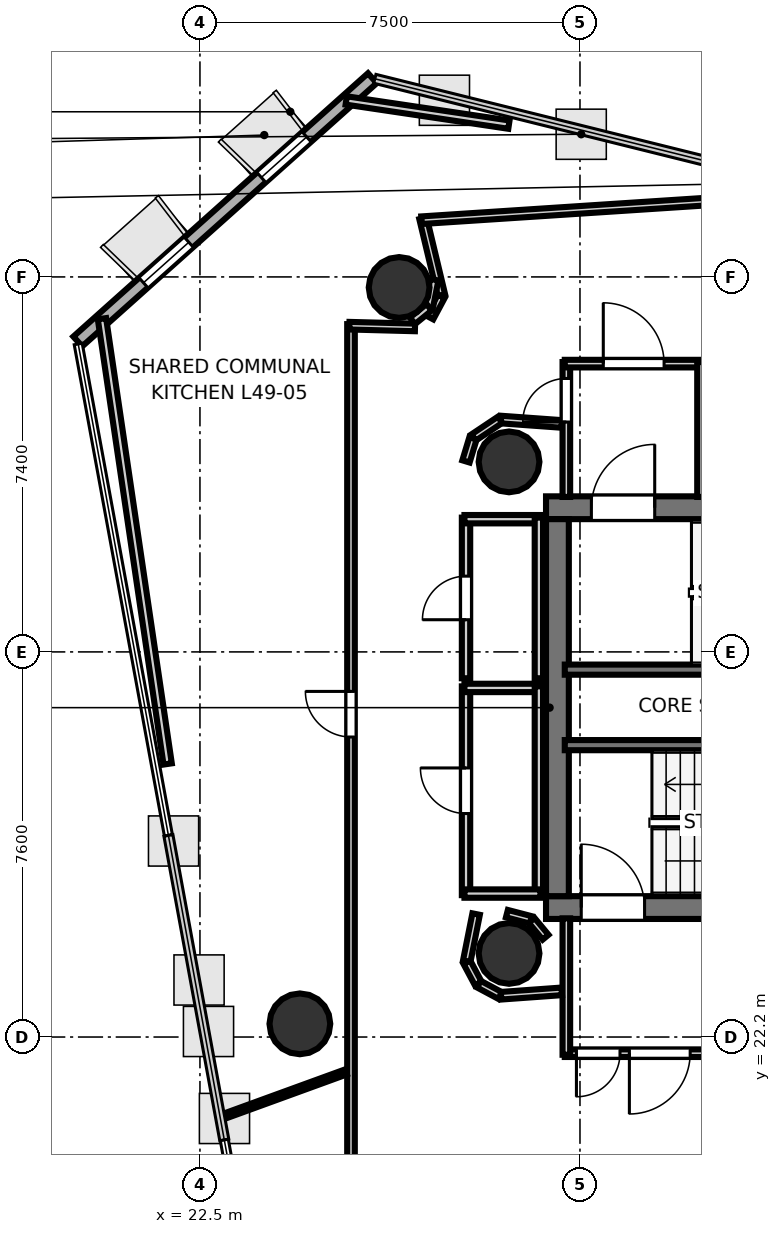
"""IFC4 building model, lengths in metres.
Left out: names, types, materials, properties, quantities, classifications, styles, units other than length and angle.
Written with IfcOpenShell. Run it as: python <this file> out.ifc"""

import sys

from ifc_helpers import new_model, si_unit, direction, frame, frame_2d, origin, origin_2d, place, context, subcontext, project, spatial, rectangle, hollow_circle, extrude, element, fill, save


model = new_model("IFC4")
c1 = context("Model", 3, precision=1e-05, world=origin(), true_north=direction((0.0, 1.0)))
c2 = subcontext(c1, "Body", "Model", "MODEL_VIEW")
j1 = project(units=[si_unit("LENGTHUNIT", "METRE"), si_unit("PLANEANGLEUNIT", "RADIAN")], contexts=[c1])
p1 = place(None, origin())
s1 = spatial("IfcSite", under=j1, at=p1, CompositionType="ELEMENT")
p2 = place(p1, origin())
s2 = spatial("IfcBuilding", under=s1, at=p2, CompositionType="ELEMENT")
p3 = place(p2, frame((0.0, 0.0, 192.9)))
s3 = spatial("IfcBuildingStorey", under=s2, at=p3, CompositionType="ELEMENT", Elevation=192.9)
p4 = place(p3, frame((29.33, 32.645, 0.0), z_axis=(0.0, 0.0, 1.0), x_axis=(1.0, 0.0, 0.0)))
e1 = element("IfcWall", 1, at=p4, inside=s3, PredefinedType="SHEAR", context=c2, shape_type="SweptSolid", body=[
    extrude(rectangle(XDim=10.52, YDim=0.45, at=frame_2d((5.26, 0.0))), origin(), (0.0, 0.0, 1.0), 3.52),
])
p5 = place(p4, frame((0.895, 0.0, 0.0)))
e2 = element("IfcOpeningElement", 2, at=p5, cuts=e1, PredefinedType="OPENING", context=c2, shape_type="SweptSolid", body=[
    extrude(rectangle(XDim=1.25, YDim=2.15, at=frame_2d((0.625, 1.075))), frame((0.0, 0.235, 0.0), z_axis=(0.0, -1.0, 0.0), x_axis=(1.0, 0.0, 0.0)), (0.0, 0.0, 1.0), 0.47),
])
p6 = place(p3, frame((29.33, 24.755, 0.0), z_axis=(0.0, 0.0, 1.0), x_axis=(1.0, 0.0, 0.0)))
e3 = element("IfcWall", 3, at=p6, inside=s3, PredefinedType="SHEAR", context=c2, shape_type="SweptSolid", body=[
    extrude(rectangle(XDim=10.52, YDim=0.45, at=frame_2d((5.26, 0.0))), origin(), (0.0, 0.0, 1.0), 3.52),
])
p7 = place(p6, frame((0.695, 0.0, 0.0)))
e4 = element("IfcOpeningElement", 4, at=p7, cuts=e3, PredefinedType="OPENING", context=c2, shape_type="SweptSolid", body=[
    extrude(rectangle(XDim=1.25, YDim=2.15, at=frame_2d((0.625, 1.075))), frame((0.0, 0.235, 0.0), z_axis=(0.0, -1.0, 0.0), x_axis=(1.0, 0.0, 0.0)), (0.0, 0.0, 1.0), 0.47),
])
p8 = place(p3, frame((29.555, 24.98, 0.0), z_axis=(0.0, 0.0, 1.0), x_axis=(0.0, 1.0, 0.0)))
e5 = element("IfcWall", 5, at=p8, inside=s3, PredefinedType="SHEAR", context=c2, shape_type="SweptSolid", body=[
    extrude(rectangle(XDim=7.44, YDim=0.45, at=frame_2d((3.72, 0.0))), origin(), (0.0, 0.0, 1.0), 3.52),
])
for number, where, z_axis, x_axis in (
    (6, (28.6, 33.55, 0.0), (0.0, 0.0, 1.0), (1.0, 0.0, 0.0)),
    (7, (28.6, 23.85, 0.0), (0.0, 0.0, 1.0), (1.0, 0.0, 0.0)),
    (8, (26.431, 36.992, 0.0), (0.0, 0.0, 1.0), (1.0, 0.0, 0.0)),
    (9, (24.472, 22.46, 0.0), (0.0, 0.0, 1.0), (1.0, 0.0, 0.0)),
):
    element("IfcColumn", number, at=place(p3, frame(where, z_axis=z_axis, x_axis=x_axis)), inside=s3, PredefinedType="COLUMN", context=c2, shape_type="SweptSolid", body=[
        extrude(hollow_circle(Radius=0.6, WallThickness=0.03, at=origin_2d()), origin(), (0.0, 0.0, 1.0), 3.7),
    ])
p9 = place(p3, frame((25.903, 41.122, 0.0), z_axis=(0.0, 0.0, 1.0), x_axis=(-0.745644847866, -0.666343575681, 0.0)))
e10 = element("IfcWall", 10, at=p9, inside=s3, PredefinedType="SOLIDWALL", context=c2, shape_type="SweptSolid", body=[
    extrude(rectangle(XDim=7.798, YDim=0.26, at=frame_2d((3.899, 0.0))), origin(), (0.0, 0.0, 1.0), 3.52),
])
p10 = place(p9, frame((1.74, 0.0, 0.9)))
e11 = element("IfcOpeningElement", 11, at=p10, cuts=e10, PredefinedType="OPENING", context=c2, shape_type="SweptSolid", body=[
    extrude(rectangle(XDim=1.2, YDim=2.0, at=frame_2d((0.6, 1.0))), frame((0.0, 0.14, 0.0), z_axis=(0.0, -1.0, 0.0), x_axis=(1.0, 0.0, 0.0)), (0.0, 0.0, 1.0), 0.28),
])
p11 = place(p9, frame((4.859, 0.0, 0.9)))
e12 = element("IfcOpeningElement", 12, at=p11, cuts=e10, PredefinedType="OPENING", context=c2, shape_type="SweptSolid", body=[
    extrude(rectangle(XDim=1.2, YDim=2.0, at=frame_2d((0.6, 1.0))), frame((0.0, 0.14, 0.0), z_axis=(0.0, -1.0, 0.0), x_axis=(1.0, 0.0, 0.0)), (0.0, 0.0, 1.0), 0.28),
])
p12 = place(p3, frame((29.7, 29.45, 0.0), z_axis=(0.0, 0.0, 1.0), x_axis=(1.0, 0.0, 0.0)))
e13 = element("IfcWall", 13, at=p12, inside=s3, PredefinedType="SOLIDWALL", context=c2, shape_type="SweptSolid", body=[
    extrude(rectangle(XDim=8.3, YDim=0.2, at=frame_2d((4.15, 0.0))), origin(), (0.0, 0.0, 1.0), 3.52),
])
p13 = place(p3, frame((29.7, 27.96, 0.0), z_axis=(0.0, 0.0, 1.0), x_axis=(1.0, 0.0, 0.0)))
e14 = element("IfcWall", 14, at=p13, inside=s3, PredefinedType="SOLIDWALL", context=c2, shape_type="SweptSolid", body=[
    extrude(rectangle(XDim=7.75, YDim=0.2, at=frame_2d((3.875, 0.0))), origin(), (0.0, 0.0, 1.0), 3.52),
])
p14 = place(p3, frame((29.731, 32.858, 0.0), z_axis=(0.0, 0.0, 1.0), x_axis=(0.0, 1.0, 0.0)))
e15 = element("IfcWall", 15, at=p14, inside=s3, PredefinedType="PARTITIONING", context=c2, shape_type="SweptSolid", body=[
    extrude(rectangle(XDim=2.662, YDim=0.15, at=frame_2d((1.331, 0.0))), origin(), (0.0, 0.0, 1.0), 2.84),
])
p15 = place(p14, frame((1.478, 0.0, 0.0)))
e16 = element("IfcOpeningElement", 16, at=p15, cuts=e15, PredefinedType="OPENING", context=c2, shape_type="SweptSolid", body=[
    extrude(rectangle(XDim=0.86, YDim=2.05, at=frame_2d((0.43, 1.025))), frame((0.0, 0.085, 0.0), z_axis=(0.0, -1.0, 0.0), x_axis=(1.0, 0.0, 0.0)), (0.0, 0.0, 1.0), 0.17),
])
p16 = place(p3, frame((29.7, 35.489, 0.0), z_axis=(0.0, 0.0, 1.0), x_axis=(1.0, 0.0, 0.0)))
e17 = element("IfcWall", 17, at=p16, inside=s3, PredefinedType="PARTITIONING", context=c2, shape_type="SweptSolid", body=[
    extrude(rectangle(XDim=2.72, YDim=0.15, at=frame_2d((1.36, 0.0))), origin(), (0.0, 0.0, 1.0), 2.84),
])
p17 = place(p16, frame((0.76, 0.0, 0.0)))
e18 = element("IfcOpeningElement", 18, at=p17, cuts=e17, PredefinedType="OPENING", context=c2, shape_type="SweptSolid", body=[
    extrude(rectangle(XDim=1.2, YDim=2.15, at=frame_2d((0.6, 1.075))), frame((0.0, 0.085, 0.0), z_axis=(0.0, -1.0, 0.0), x_axis=(1.0, 0.0, 0.0)), (0.0, 0.0, 1.0), 0.17),
])
p18 = place(p3, frame((32.389, 35.52, 0.0), z_axis=(0.0, 0.0, 1.0), x_axis=(0.0, -1.0, 0.0)))
e19 = element("IfcWall", 19, at=p18, inside=s3, PredefinedType="PARTITIONING", context=c2, shape_type="SweptSolid", body=[
    extrude(rectangle(XDim=2.662, YDim=0.15, at=frame_2d((1.331, 0.0))), origin(), (0.0, 0.0, 1.0), 2.84),
])
p19 = place(p3, frame((33.45, 21.881, 0.0), z_axis=(0.0, 0.0, 1.0), x_axis=(-1.0, 0.0, 0.0)))
e20 = element("IfcWall", 20, at=p19, inside=s3, PredefinedType="PARTITIONING", context=c2, shape_type="SweptSolid", body=[
    extrude(rectangle(XDim=3.75, YDim=0.15, at=frame_2d((1.875, 0.0))), origin(), (0.0, 0.0, 1.0), 2.84),
])
p20 = place(p19, frame((1.275, 0.0, 0.0)))
e21 = element("IfcOpeningElement", 21, at=p20, cuts=e20, PredefinedType="OPENING", context=c2, shape_type="SweptSolid", body=[
    extrude(rectangle(XDim=1.2, YDim=2.15, at=frame_2d((0.6, 1.075))), frame((0.0, 0.085, 0.0), z_axis=(0.0, -1.0, 0.0), x_axis=(1.0, 0.0, 0.0)), (0.0, 0.0, 1.0), 0.17),
])
p21 = place(p19, frame((2.66, 0.0, 0.0)))
e22 = element("IfcOpeningElement", 22, at=p21, cuts=e20, PredefinedType="OPENING", context=c2, shape_type="SweptSolid", body=[
    extrude(rectangle(XDim=0.86, YDim=2.05, at=frame_2d((0.43, 1.025))), frame((0.0, 0.085, 0.0), z_axis=(0.0, -1.0, 0.0), x_axis=(1.0, 0.0, 0.0)), (0.0, 0.0, 1.0), 0.17),
])
p22 = place(p3, frame((29.731, 21.85, 0.0), z_axis=(0.0, 0.0, 1.0), x_axis=(0.0, 1.0, 0.0)))
e23 = element("IfcWall", 23, at=p22, inside=s3, PredefinedType="PARTITIONING", context=c2, shape_type="SweptSolid", body=[
    extrude(rectangle(XDim=2.692, YDim=0.15, at=frame_2d((1.346, 0.0))), origin(), (0.0, 0.0, 1.0), 2.84),
])
p23 = place(p3, frame((27.751, 25.0, 0.0), z_axis=(0.0, 0.0, 1.0), x_axis=(0.0, 1.0, 0.0)))
e24 = element("IfcWall", 24, at=p23, inside=s3, PredefinedType="PLUMBINGWALL", context=c2, shape_type="SweptSolid", body=[
    extrude(rectangle(XDim=4.12, YDim=0.165, at=frame_2d((2.06, 0.0))), origin(), (0.0, 0.0, 1.0), 2.84),
])
p24 = place(p23, frame((1.61, 0.0, 0.0)))
e25 = element("IfcOpeningElement", 25, at=p24, cuts=e24, PredefinedType="OPENING", context=c2, shape_type="SweptSolid", body=[
    extrude(rectangle(XDim=0.9, YDim=2.1, at=frame_2d((0.45, 1.05))), frame((0.0, 0.093, 0.0), z_axis=(0.0, -1.0, 0.0), x_axis=(1.0, 0.0, 0.0)), (0.0, 0.0, 1.0), 0.185),
])
p25 = place(p3, frame((27.72, 29.089, 0.0), z_axis=(0.0, 0.0, 1.0), x_axis=(1.0, 0.0, 0.0)))
e26 = element("IfcWall", 26, at=p25, inside=s3, PredefinedType="PLUMBINGWALL", context=c2, shape_type="SweptSolid", body=[
    extrude(rectangle(XDim=1.5, YDim=0.165, at=frame_2d((0.75, 0.0))), origin(), (0.0, 0.0, 1.0), 2.84),
])
p26 = place(p3, frame((29.189, 29.12, 0.0), z_axis=(0.0, 0.0, 1.0), x_axis=(0.0, -1.0, 0.0)))
e27 = element("IfcWall", 27, at=p26, inside=s3, PredefinedType="PLUMBINGWALL", context=c2, shape_type="SweptSolid", body=[
    extrude(rectangle(XDim=4.12, YDim=0.165, at=frame_2d((2.06, 0.0))), origin(), (0.0, 0.0, 1.0), 2.84),
])
p27 = place(p3, frame((29.22, 25.031, 0.0), z_axis=(0.0, 0.0, 1.0), x_axis=(-1.0, 0.0, 0.0)))
e28 = element("IfcWall", 28, at=p27, inside=s3, PredefinedType="PLUMBINGWALL", context=c2, shape_type="SweptSolid", body=[
    extrude(rectangle(XDim=1.5, YDim=0.165, at=frame_2d((0.75, 0.0))), origin(), (0.0, 0.0, 1.0), 2.84),
])
p28 = place(p3, frame((27.751, 29.28, 0.0), z_axis=(0.0, 0.0, 1.0), x_axis=(0.0, 1.0, 0.0)))
e29 = element("IfcWall", 29, at=p28, inside=s3, PredefinedType="PLUMBINGWALL", context=c2, shape_type="SweptSolid", body=[
    extrude(rectangle(XDim=3.17, YDim=0.165, at=frame_2d((1.585, 0.0))), origin(), (0.0, 0.0, 1.0), 2.84),
])
p29 = place(p28, frame((1.155, 0.0, 0.0)))
e30 = element("IfcOpeningElement", 30, at=p29, cuts=e29, PredefinedType="OPENING", context=c2, shape_type="SweptSolid", body=[
    extrude(rectangle(XDim=0.86, YDim=2.05, at=frame_2d((0.43, 1.025))), frame((0.0, 0.093, 0.0), z_axis=(0.0, -1.0, 0.0), x_axis=(1.0, 0.0, 0.0)), (0.0, 0.0, 1.0), 0.185),
])
p30 = place(p3, frame((27.72, 32.419, 0.0), z_axis=(0.0, 0.0, 1.0), x_axis=(1.0, 0.0, 0.0)))
e31 = element("IfcWall", 31, at=p30, inside=s3, PredefinedType="PLUMBINGWALL", context=c2, shape_type="SweptSolid", body=[
    extrude(rectangle(XDim=1.5, YDim=0.165, at=frame_2d((0.75, 0.0))), origin(), (0.0, 0.0, 1.0), 2.84),
])
p31 = place(p3, frame((29.189, 32.45, 0.0), z_axis=(0.0, 0.0, 1.0), x_axis=(0.0, -1.0, 0.0)))
e32 = element("IfcWall", 32, at=p31, inside=s3, PredefinedType="PLUMBINGWALL", context=c2, shape_type="SweptSolid", body=[
    extrude(rectangle(XDim=3.17, YDim=0.165, at=frame_2d((1.585, 0.0))), origin(), (0.0, 0.0, 1.0), 2.84),
])
p32 = place(p3, frame((29.321, 24.17, 0.0), z_axis=(0.0, 0.0, 1.0), x_axis=(-0.638008265708, 0.770029514296, 0.0)))
e33 = element("IfcWall", 33, at=p32, inside=s3, PredefinedType="PARTITIONING", context=c2, shape_type="SweptSolid", body=[
    extrude(rectangle(XDim=0.431, YDim=0.15, at=frame_2d((0.215, 0.0))), origin(), (0.0, 0.0, 1.0), 2.84),
])
p33 = place(p3, frame((29.03, 24.512, 0.0), z_axis=(0.0, 0.0, 1.0), x_axis=(-0.967681003213, 0.252177469296, 0.0)))
e34 = element("IfcWall", 34, at=p33, inside=s3, PredefinedType="PARTITIONING", context=c2, shape_type="SweptSolid", body=[
    extrude(rectangle(XDim=0.488, YDim=0.15, at=frame_2d((0.244, 0.0))), origin(), (0.0, 0.0, 1.0), 2.84),
])
p34 = place(p3, frame((27.265, 36.839, 0.0), z_axis=(0.0, 0.0, 1.0), x_axis=(-0.232734022169, 0.972540423286, 0.0)))
e35 = element("IfcWall", 35, at=p34, inside=s3, PredefinedType="PARTITIONING", context=c2, shape_type="SweptSolid", body=[
    extrude(rectangle(XDim=1.561, YDim=0.15, at=frame_2d((0.781, 0.0))), origin(), (0.0, 0.0, 1.0), 2.84),
])
p35 = place(p3, frame((26.872, 38.319, 0.0), z_axis=(0.0, 0.0, 1.0), x_axis=(0.99787015213, 0.065231583509, 0.0)))
e36 = element("IfcWall", 36, at=p35, inside=s3, PredefinedType="PARTITIONING", context=c2, shape_type="SweptSolid", body=[
    extrude(rectangle(XDim=8.181, YDim=0.15, at=frame_2d((4.091, 0.0))), origin(), (0.0, 0.0, 1.0), 2.84),
])
p36 = place(p3, frame((29.64, 34.299, 0.0), z_axis=(0.0, 0.0, 1.0), x_axis=(-0.997392224386, 0.072171675429, 0.0)))
e37 = element("IfcWall", 37, at=p36, inside=s3, PredefinedType="PARTITIONING", context=c2, shape_type="SweptSolid", body=[
    extrude(rectangle(XDim=1.201, YDim=0.15, at=frame_2d((0.601, 0.0))), origin(), (0.0, 0.0, 1.0), 2.84),
])
p37 = place(p3, frame((28.423, 34.38, 0.0), z_axis=(0.0, 0.0, 1.0), x_axis=(-0.831571279003, -0.555418047903, 0.0)))
e38 = element("IfcWall", 38, at=p37, inside=s3, PredefinedType="PARTITIONING", context=c2, shape_type="SweptSolid", body=[
    extrude(rectangle(XDim=0.628, YDim=0.15, at=frame_2d((0.314, 0.0))), origin(), (0.0, 0.0, 1.0), 2.84),
])
p38 = place(p3, frame((27.888, 34.015, 0.0), z_axis=(0.0, 0.0, 1.0), x_axis=(-0.290263585829, -0.956946733492, 0.0)))
e39 = element("IfcWall", 39, at=p38, inside=s3, PredefinedType="PARTITIONING", context=c2, shape_type="SweptSolid", body=[
    extrude(rectangle(XDim=0.476, YDim=0.15, at=frame_2d((0.238, 0.0))), origin(), (0.0, 0.0, 1.0), 2.84),
])
p39 = place(p3, frame((27.95, 24.626, 0.0), z_axis=(0.0, 0.0, 1.0), x_axis=(-0.195125950178, -0.980778192848, 0.0)))
e40 = element("IfcWall", 40, at=p39, inside=s3, PredefinedType="PARTITIONING", context=c2, shape_type="SweptSolid", body=[
    extrude(rectangle(XDim=0.948, YDim=0.15, at=frame_2d((0.474, 0.0))), origin(), (0.0, 0.0, 1.0), 2.84),
])
for number, where, z_axis, x_axis in (
    (41, (27.768, 23.675, 0.0), (0.0, 0.0, 1.0), (0.472, -0.882, 0.0)),
    (42, (28.006, 23.243, 0.0), (0.0, 0.0, 1.0), (0.882, -0.472, 0.0)),
):
    element("IfcWall", number, at=place(p3, frame(where, z_axis=z_axis, x_axis=x_axis)), inside=s3, PredefinedType="PARTITIONING", context=c2, shape_type="SweptSolid", body=[
        extrude(rectangle(XDim=0.476, YDim=0.15, at=frame_2d((0.238, 0.0))), origin(), (0.0, 0.0, 1.0), 2.84),
    ])
p40 = place(p3, frame((28.442, 23.015, 0.0), z_axis=(0.0, 0.0, 1.0), x_axis=(0.99740683837, 0.07196942943, 0.0)))
e43 = element("IfcWall", 43, at=p40, inside=s3, PredefinedType="PARTITIONING", context=c2, shape_type="SweptSolid", body=[
    extrude(rectangle(XDim=1.201, YDim=0.15, at=frame_2d((0.601, 0.0))), origin(), (0.0, 0.0, 1.0), 2.84),
])
p41 = place(p3, frame((25.481, 18.05, 0.0), z_axis=(0.0, 0.0, 1.0), x_axis=(0.0, 1.0, 0.0)))
e44 = element("IfcWall", 44, at=p41, inside=s3, PredefinedType="PARTITIONING", context=c2, shape_type="SweptSolid", body=[
    extrude(rectangle(XDim=18.219, YDim=0.15, at=frame_2d((9.109, 0.0))), origin(), (0.0, 0.0, 1.0), 2.84),
])
p42 = place(p41, frame((0.511, 0.0, 0.0)))
e45 = element("IfcOpeningElement", 45, at=p42, cuts=e44, PredefinedType="OPENING", context=c2, shape_type="SweptSolid", body=[
    extrude(rectangle(XDim=1.25, YDim=2.2, at=frame_2d((0.625, 1.1))), frame((0.0, 0.085, 0.0), z_axis=(0.0, -1.0, 0.0), x_axis=(1.0, 0.0, 0.0)), (0.0, 0.0, 1.0), 0.17),
])
p43 = place(p41, frame((10.07, 0.0, 0.0)))
e46 = element("IfcOpeningElement", 46, at=p43, cuts=e44, PredefinedType="OPENING", context=c2, shape_type="SweptSolid", body=[
    extrude(rectangle(XDim=0.9, YDim=2.1, at=frame_2d((0.45, 1.05))), frame((0.0, 0.085, 0.0), z_axis=(0.0, -1.0, 0.0), x_axis=(1.0, 0.0, 0.0)), (0.0, 0.0, 1.0), 0.17),
])
p44 = place(p3, frame((25.449, 36.238, 0.0), z_axis=(0.0, 0.0, 1.0), x_axis=(0.999651698073, -0.026390955635, 0.0)))
e47 = element("IfcWall", 47, at=p44, inside=s3, PredefinedType="PARTITIONING", context=c2, shape_type="SweptSolid", body=[
    extrude(rectangle(XDim=1.295, YDim=0.15, at=frame_2d((0.647, 0.0))), origin(), (0.0, 0.0, 1.0), 2.84),
])
p45 = place(p3, frame((27.038, 36.398, 0.0), z_axis=(0.0, 0.0, 1.0), x_axis=(0.471865548338, 0.881670519123, 0.0)))
e48 = element("IfcWall", 48, at=p45, inside=s3, PredefinedType="PARTITIONING", context=c2, shape_type="SweptSolid", body=[
    extrude(rectangle(XDim=0.476, YDim=0.15, at=frame_2d((0.238, 0.0))), origin(), (0.0, 0.0, 1.0), 2.84),
])
p46 = place(p3, frame((22.881, 20.601, 0.0), z_axis=(0.0, 0.0, 1.0), x_axis=(0.939683512966, 0.342045165819, 0.0)))
e49 = element("IfcWall", 49, at=p46, inside=s3, PredefinedType="PARTITIONING", context=c2, shape_type="SweptSolid", body=[
    extrude(rectangle(XDim=2.66, YDim=0.105, at=frame_2d((1.33, 0.0))), origin(), (0.0, 0.0, 1.0), 2.84),
])
p47 = place(p3, frame((25.387, 40.683, 0.0), z_axis=(0.0, 0.0, 1.0), x_axis=(0.989119304191, -0.147115607862, 0.0)))
e50 = element("IfcWall", 50, at=p47, inside=s3, PredefinedType="PLUMBINGWALL", context=c2, shape_type="SweptSolid", body=[
    extrude(rectangle(XDim=3.246, YDim=0.165, at=frame_2d((1.623, 0.0))), origin(), (0.0, 0.0, 1.0), 2.84),
])
p48 = place(p3, frame((27.125, 37.146, 0.0), z_axis=(0.0, 0.0, 1.0), x_axis=(-0.195051328877, -0.980793035815, 0.0)))
e51 = element("IfcWall", 51, at=p48, inside=s3, PredefinedType="PLUMBINGWALL", context=c2, shape_type="SweptSolid", body=[
    extrude(rectangle(XDim=0.573, YDim=0.165, at=frame_2d((0.287, 0.0))), origin(), (0.0, 0.0, 1.0), 2.84),
])
p49 = place(p3, frame((27.024, 36.602, 0.0), z_axis=(0.0, 0.0, 1.0), x_axis=(-0.775745027902, -0.631046473475, 0.0)))
e52 = element("IfcWall", 52, at=p49, inside=s3, PredefinedType="PLUMBINGWALL", context=c2, shape_type="SweptSolid", body=[
    extrude(rectangle(XDim=0.425, YDim=0.165, at=frame_2d((0.213, 0.0))), origin(), (0.0, 0.0, 1.0), 2.84),
])
p50 = place(p3, frame((21.863, 27.589, 0.0), z_axis=(0.0, 0.0, 1.0), x_axis=(-0.145956904229, 0.989290949169, 0.0)))
e53 = element("IfcWall", 53, at=p50, inside=s3, PredefinedType="PLUMBINGWALL", context=c2, shape_type="SweptSolid", body=[
    extrude(rectangle(XDim=8.882, YDim=0.165, at=frame_2d((4.441, 0.0))), origin(), (0.0, 0.0, 1.0), 2.84),
])
p51 = place(p5, origin())
e54 = element("IfcDoor", 54, at=p51, inside=s3, OperationType="SINGLE_SWING_RIGHT", PredefinedType="DOOR", context=c2, shape_type="SweptSolid", body=[
    extrude(rectangle(XDim=1.25, YDim=2.15, at=frame_2d((0.625, 1.075))), frame((0.0, 0.025, 0.0), z_axis=(0.0, -1.0, 0.0), x_axis=(1.0, 0.0, 0.0)), (0.0, 0.0, 1.0), 0.05),
])
fill(e2, e54)
p52 = place(p7, origin())
e55 = element("IfcDoor", 55, at=p52, inside=s3, OperationType="SINGLE_SWING_LEFT", PredefinedType="DOOR", context=c2, shape_type="SweptSolid", body=[
    extrude(rectangle(XDim=1.25, YDim=2.15, at=frame_2d((0.625, 1.075))), frame((0.0, 0.025, 0.0), z_axis=(0.0, -1.0, 0.0), x_axis=(1.0, 0.0, 0.0)), (0.0, 0.0, 1.0), 0.05),
])
fill(e4, e55)
p53 = place(p17, origin())
e56 = element("IfcDoor", 56, at=p53, inside=s3, OperationType="SINGLE_SWING_LEFT", PredefinedType="DOOR", context=c2, shape_type="SweptSolid", body=[
    extrude(rectangle(XDim=1.2, YDim=2.15, at=frame_2d((0.6, 1.075))), frame((0.0, 0.025, 0.0), z_axis=(0.0, -1.0, 0.0), x_axis=(1.0, 0.0, 0.0)), (0.0, 0.0, 1.0), 0.05),
])
fill(e18, e56)
p54 = place(p20, origin())
e57 = element("IfcDoor", 57, at=p54, inside=s3, OperationType="SINGLE_SWING_RIGHT", PredefinedType="DOOR", context=c2, shape_type="SweptSolid", body=[
    extrude(rectangle(XDim=1.2, YDim=2.15, at=frame_2d((0.6, 1.075))), frame((0.0, 0.025, 0.0), z_axis=(0.0, -1.0, 0.0), x_axis=(1.0, 0.0, 0.0)), (0.0, 0.0, 1.0), 0.05),
])
fill(e21, e57)
p55 = place(p24, origin())
e58 = element("IfcDoor", 58, at=p55, inside=s3, OperationType="SINGLE_SWING_RIGHT", PredefinedType="DOOR", context=c2, shape_type="SweptSolid", body=[
    extrude(rectangle(XDim=0.9, YDim=2.1, at=frame_2d((0.45, 1.05))), frame((0.0, 0.025, 0.0), z_axis=(0.0, -1.0, 0.0), x_axis=(1.0, 0.0, 0.0)), (0.0, 0.0, 1.0), 0.05),
])
fill(e25, e58)
p56 = place(p29, origin())
e59 = element("IfcDoor", 59, at=p56, inside=s3, OperationType="SINGLE_SWING_LEFT", PredefinedType="DOOR", context=c2, shape_type="SweptSolid", body=[
    extrude(rectangle(XDim=0.86, YDim=2.05, at=frame_2d((0.43, 1.025))), frame((0.0, 0.025, 0.0), z_axis=(0.0, -1.0, 0.0), x_axis=(1.0, 0.0, 0.0)), (0.0, 0.0, 1.0), 0.05),
])
fill(e30, e59)
p57 = place(p15, origin())
e60 = element("IfcDoor", 60, at=p57, inside=s3, OperationType="SINGLE_SWING_LEFT", PredefinedType="DOOR", context=c2, shape_type="SweptSolid", body=[
    extrude(rectangle(XDim=0.86, YDim=2.05, at=frame_2d((0.43, 1.025))), frame((0.0, 0.025, 0.0), z_axis=(0.0, -1.0, 0.0), x_axis=(1.0, 0.0, 0.0)), (0.0, 0.0, 1.0), 0.05),
])
fill(e16, e60)
p58 = place(p21, origin())
e61 = element("IfcDoor", 61, at=p58, inside=s3, OperationType="SINGLE_SWING_RIGHT", PredefinedType="DOOR", context=c2, shape_type="SweptSolid", body=[
    extrude(rectangle(XDim=0.86, YDim=2.05, at=frame_2d((0.43, 1.025))), frame((0.0, 0.025, 0.0), z_axis=(0.0, -1.0, 0.0), x_axis=(1.0, 0.0, 0.0)), (0.0, 0.0, 1.0), 0.05),
])
fill(e22, e61)
p59 = place(p43, origin())
e62 = element("IfcDoor", 62, at=p59, inside=s3, OperationType="SINGLE_SWING_RIGHT", PredefinedType="DOOR", context=c2, shape_type="SweptSolid", body=[
    extrude(rectangle(XDim=0.9, YDim=2.1, at=frame_2d((0.45, 1.05))), frame((0.0, 0.025, 0.0), z_axis=(0.0, -1.0, 0.0), x_axis=(1.0, 0.0, 0.0)), (0.0, 0.0, 1.0), 0.05),
])
fill(e46, e62)
p60 = place(p10, origin())
e63 = element("IfcWindow", 63, at=p60, inside=s3, PartitioningType="SINGLE_PANEL", PredefinedType="WINDOW", context=c2, shape_type="SweptSolid", body=[
    extrude(rectangle(XDim=1.2, YDim=2.0, at=frame_2d((0.6, 1.0))), frame((0.0, 0.03, 0.0), z_axis=(0.0, -1.0, 0.0), x_axis=(1.0, 0.0, 0.0)), (0.0, 0.0, 1.0), 0.06),
])
fill(e11, e63)
p61 = place(p11, origin())
e64 = element("IfcWindow", 64, at=p61, inside=s3, PartitioningType="SINGLE_PANEL", PredefinedType="WINDOW", context=c2, shape_type="SweptSolid", body=[
    extrude(rectangle(XDim=1.2, YDim=2.0, at=frame_2d((0.6, 1.0))), frame((0.0, 0.03, 0.0), z_axis=(0.0, -1.0, 0.0), x_axis=(1.0, 0.0, 0.0)), (0.0, 0.0, 1.0), 0.06),
])
fill(e12, e64)
save(model, sys.argv[1])
